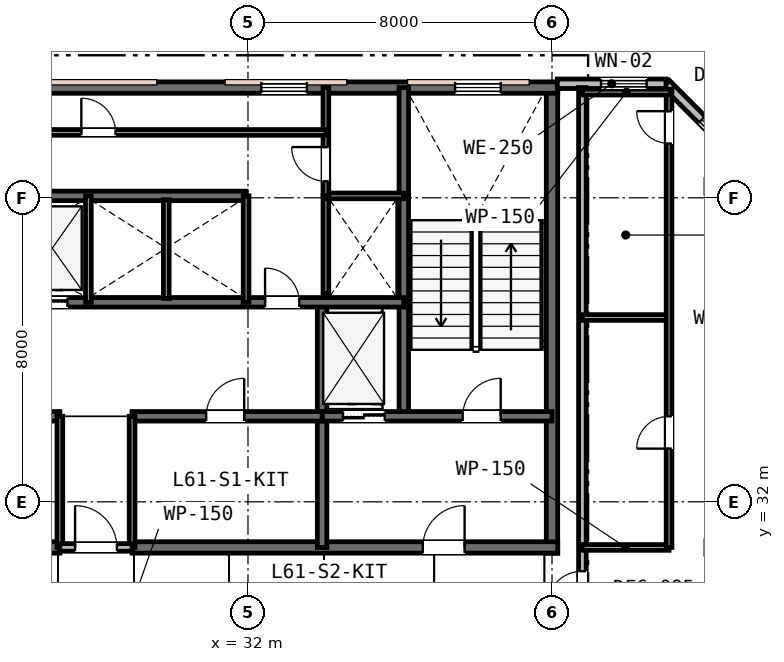
"""IFC4 building model, lengths in metres.
Left out: names, types, materials, properties, quantities, classifications, styles, units other than length and angle.
Written with IfcOpenShell. Run it as: python <this file> out.ifc"""

import sys

from ifc_helpers import new_model, si_unit, direction, frame, frame_2d, origin, place, context, subcontext, project, spatial, rectangle, extrude, element, fill, save


model = new_model("IFC4")
c1 = context("Model", 3, precision=1e-05, world=origin(), true_north=direction((0.0, 1.0)))
c2 = subcontext(c1, "Body", "Model", "MODEL_VIEW")
j1 = project(units=[si_unit("LENGTHUNIT", "METRE"), si_unit("PLANEANGLEUNIT", "RADIAN")], contexts=[c1])
p1 = place(None, origin())
s1 = spatial("IfcSite", under=j1, at=p1, CompositionType="ELEMENT")
p2 = place(p1, origin())
s2 = spatial("IfcBuilding", under=s1, at=p2, CompositionType="ELEMENT")
p3 = place(p2, frame((0.0, 0.0, 237.4)))
s3 = spatial("IfcBuildingStorey", under=s2, at=p3, CompositionType="ELEMENT", Elevation=237.4)
p4 = place(p3, frame((40.0, 30.65, 0.0), z_axis=(0.0, 0.0, 1.0), x_axis=(0.0, 1.0, 0.0)))
e1 = element("IfcWall", 1, at=p4, inside=s3, PredefinedType="SHEAR", context=c2, shape_type="SweptSolid", body=[
    extrude(rectangle(XDim=12.3, YDim=0.3, at=frame_2d((6.15, 0.0))), origin(), (0.0, 0.0, 1.0), 3.8),
])
p5 = place(p3, frame((15.85, 42.9, 0.0), z_axis=(0.0, 0.0, 1.0), x_axis=(1.0, 0.0, 0.0)))
e2 = element("IfcWall", 2, at=p5, inside=s3, PredefinedType="SHEAR", context=c2, shape_type="SweptSolid", body=[
    extrude(rectangle(XDim=24.3, YDim=0.3, at=frame_2d((12.15, 0.0))), origin(), (0.0, 0.0, 1.0), 3.8),
])
p6 = place(p5, frame((1.6, 0.0, 0.95)))
e3 = element("IfcOpeningElement", 3, at=p6, cuts=e2, PredefinedType="OPENING", context=c2, shape_type="SweptSolid", body=[
    extrude(rectangle(XDim=1.2, YDim=1.6, at=frame_2d((0.6, 0.8))), frame((0.0, 0.16, 0.0), z_axis=(0.0, -1.0, 0.0), x_axis=(1.0, 0.0, 0.0)), (0.0, 0.0, 1.0), 0.32),
])
p7 = place(p5, frame((16.5, 0.0, 0.95)))
e4 = element("IfcOpeningElement", 4, at=p7, cuts=e2, PredefinedType="OPENING", context=c2, shape_type="SweptSolid", body=[
    extrude(rectangle(XDim=1.2, YDim=1.6, at=frame_2d((0.6, 0.8))), frame((0.0, 0.16, 0.0), z_axis=(0.0, -1.0, 0.0), x_axis=(1.0, 0.0, 0.0)), (0.0, 0.0, 1.0), 0.32),
])
p8 = place(p5, frame((21.6, 0.0, 0.95)))
e5 = element("IfcOpeningElement", 5, at=p8, cuts=e2, PredefinedType="OPENING", context=c2, shape_type="SweptSolid", body=[
    extrude(rectangle(XDim=1.2, YDim=1.6, at=frame_2d((0.6, 0.8))), frame((0.0, 0.16, 0.0), z_axis=(0.0, -1.0, 0.0), x_axis=(1.0, 0.0, 0.0)), (0.0, 0.0, 1.0), 0.32),
])
p9 = place(p3, frame((15.85, 30.8, 0.0), z_axis=(0.0, 0.0, 1.0), x_axis=(1.0, 0.0, 0.0)))
e6 = element("IfcWall", 6, at=p9, inside=s3, PredefinedType="SHEAR", context=c2, shape_type="SweptSolid", body=[
    extrude(rectangle(XDim=11.2, YDim=0.3, at=frame_2d((5.6, 0.0))), origin(), (0.0, 0.0, 1.0), 3.8),
])
p10 = place(p9, frame((2.45, 0.0, 0.0)))
e7 = element("IfcOpeningElement", 7, at=p10, cuts=e6, PredefinedType="OPENING", context=c2, shape_type="SweptSolid", body=[
    extrude(rectangle(XDim=1.1, YDim=2.15, at=frame_2d((0.55, 1.075))), frame((0.0, 0.16, 0.0), z_axis=(0.0, -1.0, 0.0), x_axis=(1.0, 0.0, 0.0)), (0.0, 0.0, 1.0), 0.32),
])
p11 = place(p3, frame((28.95, 30.8, 0.0), z_axis=(0.0, 0.0, 1.0), x_axis=(1.0, 0.0, 0.0)))
e8 = element("IfcWall", 8, at=p11, inside=s3, PredefinedType="SHEAR", context=c2, shape_type="SweptSolid", body=[
    extrude(rectangle(XDim=11.2, YDim=0.3, at=frame_2d((5.6, 0.0))), origin(), (0.0, 0.0, 1.0), 3.8),
])
p12 = place(p11, frame((7.65, 0.0, 0.0)))
e9 = element("IfcOpeningElement", 9, at=p12, cuts=e8, PredefinedType="OPENING", context=c2, shape_type="SweptSolid", body=[
    extrude(rectangle(XDim=1.1, YDim=2.15, at=frame_2d((0.55, 1.075))), frame((0.0, 0.16, 0.0), z_axis=(0.0, -1.0, 0.0), x_axis=(1.0, 0.0, 0.0)), (0.0, 0.0, 1.0), 0.32),
])
p13 = place(p3, frame((36.1, 34.25, 0.0), z_axis=(0.0, 0.0, 1.0), x_axis=(0.0, 1.0, 0.0)))
e10 = element("IfcWall", 10, at=p13, inside=s3, PredefinedType="SHEAR", context=c2, shape_type="SweptSolid", body=[
    extrude(rectangle(XDim=8.65, YDim=0.25, at=frame_2d((4.325, 0.0))), origin(), (0.0, 0.0, 1.0), 3.8),
])
p14 = place(p3, frame((33.95, 30.8, 0.0), z_axis=(0.0, 0.0, 1.0), x_axis=(0.0, 1.0, 0.0)))
e11 = element("IfcWall", 11, at=p14, inside=s3, PredefinedType="SHEAR", context=c2, shape_type="SweptSolid", body=[
    extrude(rectangle(XDim=6.45, YDim=0.25, at=frame_2d((3.225, 0.0))), origin(), (0.0, 0.0, 1.0), 3.8),
])
p15 = place(p3, frame((33.95, 34.25, 0.0), z_axis=(0.0, 0.0, 1.0), x_axis=(1.0, 0.0, 0.0)))
e12 = element("IfcWall", 12, at=p15, inside=s3, PredefinedType="SHEAR", context=c2, shape_type="SweptSolid", body=[
    extrude(rectangle(XDim=6.05, YDim=0.25, at=frame_2d((3.025, 0.0))), origin(), (0.0, 0.0, 1.0), 3.8),
])
p16 = place(p15, frame((3.7, 0.0, 0.0)))
e13 = element("IfcOpeningElement", 13, at=p16, cuts=e12, PredefinedType="OPENING", context=c2, shape_type="SweptSolid", body=[
    extrude(rectangle(XDim=1.0, YDim=2.15, at=frame_2d((0.5, 1.075))), frame((0.0, 0.135, 0.0), z_axis=(0.0, -1.0, 0.0), x_axis=(1.0, 0.0, 0.0)), (0.0, 0.0, 1.0), 0.27),
])
p17 = place(p15, frame((0.55, 0.0, 0.0)))
e14 = element("IfcOpeningElement", 14, at=p17, cuts=e12, PredefinedType="OPENING", context=c2, shape_type="SweptSolid", body=[
    extrude(rectangle(XDim=1.1, YDim=2.15, at=frame_2d((0.55, 1.075))), frame((0.0, 0.135, 0.0), z_axis=(0.0, -1.0, 0.0), x_axis=(1.0, 0.0, 0.0)), (0.0, 0.0, 1.0), 0.27),
])
p18 = place(p3, frame((22.05, 34.25, 0.0), z_axis=(0.0, 0.0, 1.0), x_axis=(1.0, 0.0, 0.0)))
e15 = element("IfcWall", 15, at=p18, inside=s3, PredefinedType="SHEAR", context=c2, shape_type="SweptSolid", body=[
    extrude(rectangle(XDim=5.0, YDim=0.25, at=frame_2d((2.5, 0.0))), origin(), (0.0, 0.0, 1.0), 3.8),
])
p19 = place(p18, frame((1.95, 0.0, 0.0)))
e16 = element("IfcOpeningElement", 16, at=p19, cuts=e15, PredefinedType="OPENING", context=c2, shape_type="SweptSolid", body=[
    extrude(rectangle(XDim=1.0, YDim=2.15, at=frame_2d((0.5, 1.075))), frame((0.0, 0.135, 0.0), z_axis=(0.0, -1.0, 0.0), x_axis=(1.0, 0.0, 0.0)), (0.0, 0.0, 1.0), 0.27),
])
p20 = place(p3, frame((28.95, 34.25, 0.0), z_axis=(0.0, 0.0, 1.0), x_axis=(1.0, 0.0, 0.0)))
e17 = element("IfcWall", 17, at=p20, inside=s3, PredefinedType="SHEAR", context=c2, shape_type="SweptSolid", body=[
    extrude(rectangle(XDim=5.0, YDim=0.25, at=frame_2d((2.5, 0.0))), origin(), (0.0, 0.0, 1.0), 3.8),
])
p21 = place(p20, frame((1.95, 0.0, 0.0)))
e18 = element("IfcOpeningElement", 18, at=p21, cuts=e17, PredefinedType="OPENING", context=c2, shape_type="SweptSolid", body=[
    extrude(rectangle(XDim=1.0, YDim=2.15, at=frame_2d((0.5, 1.075))), frame((0.0, 0.135, 0.0), z_axis=(0.0, -1.0, 0.0), x_axis=(1.0, 0.0, 0.0)), (0.0, 0.0, 1.0), 0.27),
])
p22 = place(p3, frame((19.9, 37.25, 0.0), z_axis=(0.0, 0.0, 1.0), x_axis=(1.0, 0.0, 0.0)))
e19 = element("IfcWall", 19, at=p22, inside=s3, PredefinedType="SHEAR", context=c2, shape_type="SweptSolid", body=[
    extrude(rectangle(XDim=16.2, YDim=0.25, at=frame_2d((8.1, 0.0))), origin(), (0.0, 0.0, 1.0), 3.8),
])
p23 = place(p22, frame((12.55, 0.0, 0.0)))
e20 = element("IfcOpeningElement", 20, at=p23, cuts=e19, PredefinedType="OPENING", context=c2, shape_type="SweptSolid", body=[
    extrude(rectangle(XDim=0.9, YDim=2.15, at=frame_2d((0.45, 1.075))), frame((0.0, 0.135, 0.0), z_axis=(0.0, -1.0, 0.0), x_axis=(1.0, 0.0, 0.0)), (0.0, 0.0, 1.0), 0.27),
])
p24 = place(p22, frame((2.5, 0.0, 0.0)))
e21 = element("IfcOpeningElement", 21, at=p24, cuts=e19, PredefinedType="OPENING", context=c2, shape_type="SweptSolid", body=[
    extrude(rectangle(XDim=1.05, YDim=2.15, at=frame_2d((0.525, 1.075))), frame((0.0, 0.135, 0.0), z_axis=(0.0, -1.0, 0.0), x_axis=(1.0, 0.0, 0.0)), (0.0, 0.0, 1.0), 0.27),
])
p25 = place(p22, frame((4.4, 0.0, 0.0)))
e22 = element("IfcOpeningElement", 22, at=p25, cuts=e19, PredefinedType="OPENING", context=c2, shape_type="SweptSolid", body=[
    extrude(rectangle(XDim=1.05, YDim=2.15, at=frame_2d((0.525, 1.075))), frame((0.0, 0.135, 0.0), z_axis=(0.0, -1.0, 0.0), x_axis=(1.0, 0.0, 0.0)), (0.0, 0.0, 1.0), 0.27),
])
p26 = place(p22, frame((6.3, 0.0, 0.0)))
e23 = element("IfcOpeningElement", 23, at=p26, cuts=e19, PredefinedType="OPENING", context=c2, shape_type="SweptSolid", body=[
    extrude(rectangle(XDim=1.05, YDim=2.15, at=frame_2d((0.525, 1.075))), frame((0.0, 0.135, 0.0), z_axis=(0.0, -1.0, 0.0), x_axis=(1.0, 0.0, 0.0)), (0.0, 0.0, 1.0), 0.27),
])
p27 = place(p3, frame((19.9, 40.05, 0.0), z_axis=(0.0, 0.0, 1.0), x_axis=(1.0, 0.0, 0.0)))
e24 = element("IfcWall", 24, at=p27, inside=s3, PredefinedType="SHEAR", context=c2, shape_type="SweptSolid", body=[
    extrude(rectangle(XDim=12.05, YDim=0.25, at=frame_2d((6.025, 0.0))), origin(), (0.0, 0.0, 1.0), 3.8),
])
p28 = place(p3, frame((46.0, 40.0, 0.0), z_axis=(0.0, 0.0, 1.0), x_axis=(-0.707106781187, 0.707106781187, 0.0)))
e25 = element("IfcWall", 25, at=p28, inside=s3, PredefinedType="STANDARD", context=c2, shape_type="SweptSolid", body=[
    extrude(rectangle(XDim=4.243, YDim=0.25, at=frame_2d((2.121, 0.0))), origin(), (0.0, 0.0, 1.0), 3.53),
])
p29 = place(p28, frame((1.111, 0.0, 0.75)))
e26 = element("IfcOpeningElement", 26, at=p29, cuts=e25, PredefinedType="OPENING", context=c2, shape_type="SweptSolid", body=[
    extrude(rectangle(XDim=1.8, YDim=1.85, at=frame_2d((0.9, 0.925))), frame((0.0, 0.135, 0.0), z_axis=(0.0, -1.0, 0.0), x_axis=(1.0, 0.0, 0.0)), (0.0, 0.0, 1.0), 0.27),
])
p30 = place(p3, frame((43.0, 43.0, 0.0), z_axis=(0.0, 0.0, 1.0), x_axis=(-1.0, 0.0, 0.0)))
e27 = element("IfcWall", 27, at=p30, inside=s3, PredefinedType="STANDARD", context=c2, shape_type="SweptSolid", body=[
    extrude(rectangle(XDim=2.86, YDim=0.25, at=frame_2d((1.43, 0.0))), origin(), (0.0, 0.0, 1.0), 3.53),
])
p31 = place(p30, frame((0.51, 0.0, 0.85)))
e28 = element("IfcOpeningElement", 28, at=p31, cuts=e27, PredefinedType="OPENING", context=c2, shape_type="SweptSolid", body=[
    extrude(rectangle(XDim=1.2, YDim=1.6, at=frame_2d((0.6, 0.8))), frame((0.0, 0.135, 0.0), z_axis=(0.0, -1.0, 0.0), x_axis=(1.0, 0.0, 0.0)), (0.0, 0.0, 1.0), 0.27),
])
for number, where, z_axis, x_axis in (
    (29, (27.05, 30.8, 0.0), (0.0, 0.0, 1.0), (0.0, 1.0, 0.0)),
    (30, (28.95, 30.8, 0.0), (0.0, 0.0, 1.0), (0.0, 1.0, 0.0)),
):
    element("IfcWall", number, at=place(p3, frame(where, z_axis=z_axis, x_axis=x_axis)), inside=s3, PredefinedType="PLUMBINGWALL", context=c2, shape_type="SweptSolid", body=[
        extrude(rectangle(XDim=3.45, YDim=0.15, at=frame_2d((1.725, 0.0))), origin(), (0.0, 0.0, 1.0), 3.22),
    ])
p32 = place(p3, frame((27.05, 30.8, 0.0), z_axis=(0.0, 0.0, 1.0), x_axis=(1.0, 0.0, 0.0)))
e31 = element("IfcWall", 31, at=p32, inside=s3, PredefinedType="PARTITIONING", context=c2, shape_type="SweptSolid", body=[
    extrude(rectangle(XDim=1.9, YDim=0.2, at=frame_2d((0.95, 0.0))), origin(), (0.0, 0.0, 1.0), 3.22),
])
p33 = place(p32, frame((0.4, 0.0, 0.0)))
e32 = element("IfcOpeningElement", 32, at=p33, cuts=e31, PredefinedType="OPENING", context=c2, shape_type="SweptSolid", body=[
    extrude(rectangle(XDim=1.1, YDim=2.15, at=frame_2d((0.55, 1.075))), frame((0.0, 0.11, 0.0), z_axis=(0.0, -1.0, 0.0), x_axis=(1.0, 0.0, 0.0)), (0.0, 0.0, 1.0), 0.22),
])
for number, where, z_axis, x_axis in (
    (33, (27.8, 37.25, 0.0), (0.0, 0.0, 1.0), (0.0, 1.0, 0.0)),
    (34, (31.95, 37.25, 0.0), (0.0, 0.0, 1.0), (0.0, 1.0, 0.0)),
):
    element("IfcWall", number, at=place(p3, frame(where, z_axis=z_axis, x_axis=x_axis)), inside=s3, PredefinedType="PLUMBINGWALL", context=c2, shape_type="SweptSolid", body=[
        extrude(rectangle(XDim=2.8, YDim=0.15, at=frame_2d((1.4, 0.0))), origin(), (0.0, 0.0, 1.0), 3.53),
    ])
p34 = place(p3, frame((29.85, 37.35, 0.0), z_axis=(0.0, 0.0, 1.0), x_axis=(0.0, 1.0, 0.0)))
e35 = element("IfcWall", 35, at=p34, inside=s3, PredefinedType="PLUMBINGWALL", context=c2, shape_type="SweptSolid", body=[
    extrude(rectangle(XDim=2.6, YDim=0.15, at=frame_2d((1.3, 0.0))), origin(), (0.0, 0.0, 1.0), 3.53),
])
p35 = place(p3, frame((34.05, 37.473, 0.0), z_axis=(0.0, 0.0, 1.0), x_axis=(0.0, 1.0, 0.0)))
e36 = element("IfcWall", 36, at=p35, inside=s3, PredefinedType="PLUMBINGWALL", context=c2, shape_type="SweptSolid", body=[
    extrude(rectangle(XDim=2.577, YDim=0.15, at=frame_2d((1.288, 0.0))), origin(), (0.0, 0.0, 1.0), 3.53),
])
p36 = place(p3, frame((34.05, 40.05, 0.0), z_axis=(0.0, 0.0, 1.0), x_axis=(1.0, 0.0, 0.0)))
e37 = element("IfcWall", 37, at=p36, inside=s3, PredefinedType="PARTITIONING", context=c2, shape_type="SweptSolid", body=[
    extrude(rectangle(XDim=2.05, YDim=0.15, at=frame_2d((1.025, 0.0))), origin(), (0.0, 0.0, 1.0), 3.53),
])
p37 = place(p3, frame((34.05, 40.05, 0.0), z_axis=(0.0, 0.0, 1.0), x_axis=(0.0, 1.0, 0.0)))
e38 = element("IfcWall", 38, at=p37, inside=s3, PredefinedType="PARTITIONING", context=c2, shape_type="SweptSolid", body=[
    extrude(rectangle(XDim=2.85, YDim=0.15, at=frame_2d((1.425, 0.0))), origin(), (0.0, 0.0, 1.0), 3.53),
])
p38 = place(p37, frame((0.385, 0.0, 0.0)))
e39 = element("IfcOpeningElement", 39, at=p38, cuts=e38, PredefinedType="OPENING", context=c2, shape_type="SweptSolid", body=[
    extrude(rectangle(XDim=0.9, YDim=2.15, at=frame_2d((0.45, 1.075))), frame((0.0, 0.085, 0.0), z_axis=(0.0, -1.0, 0.0), x_axis=(1.0, 0.0, 0.0)), (0.0, 0.0, 1.0), 0.17),
])
p39 = place(p3, frame((22.08, 41.72, 0.0), z_axis=(0.0, 0.0, 1.0), x_axis=(1.0, 0.0, 0.0)))
e40 = element("IfcWall", 40, at=p39, inside=s3, PredefinedType="PARTITIONING", context=c2, shape_type="SweptSolid", body=[
    extrude(rectangle(XDim=11.97, YDim=0.15, at=frame_2d((5.985, 0.0))), origin(), (0.0, 0.0, 1.0), 3.53),
])
p40 = place(p39, frame((5.535, 0.0, 0.0)))
e41 = element("IfcOpeningElement", 41, at=p40, cuts=e40, PredefinedType="OPENING", context=c2, shape_type="SweptSolid", body=[
    extrude(rectangle(XDim=0.9, YDim=2.15, at=frame_2d((0.45, 1.075))), frame((0.0, 0.085, 0.0), z_axis=(0.0, -1.0, 0.0), x_axis=(1.0, 0.0, 0.0)), (0.0, 0.0, 1.0), 0.17),
])
p41 = place(p3, frame((40.8, 28.6, 0.0), z_axis=(0.0, 0.0, 1.0), x_axis=(0.0, 1.0, 0.0)))
e42 = element("IfcWall", 42, at=p41, inside=s3, PredefinedType="PARTITIONING", context=c2, shape_type="SweptSolid", body=[
    extrude(rectangle(XDim=14.3, YDim=0.2, at=frame_2d((7.15, 0.0))), origin(), (0.0, 0.0, 1.0), 2.92),
])
p42 = place(p41, frame((0.625, 0.0, 0.0)))
e43 = element("IfcOpeningElement", 43, at=p42, cuts=e42, PredefinedType="OPENING", context=c2, shape_type="SweptSolid", body=[
    extrude(rectangle(XDim=0.95, YDim=2.15, at=frame_2d((0.475, 1.075))), frame((0.0, 0.11, 0.0), z_axis=(0.0, -1.0, 0.0), x_axis=(1.0, 0.0, 0.0)), (0.0, 0.0, 1.0), 0.22),
])
p43 = place(p3, frame((40.8, 30.8, 0.0), z_axis=(0.0, 0.0, 1.0), x_axis=(1.0, 0.0, 0.0)))
e44 = element("IfcWall", 44, at=p43, inside=s3, PredefinedType="PARTITIONING", context=c2, shape_type="SweptSolid", body=[
    extrude(rectangle(XDim=2.28, YDim=0.15, at=frame_2d((1.14, 0.0))), origin(), (0.0, 0.0, 1.0), 2.92),
])
p44 = place(p3, frame((40.8, 36.85, 0.0), z_axis=(0.0, 0.0, 1.0), x_axis=(1.0, 0.0, 0.0)))
e45 = element("IfcWall", 45, at=p44, inside=s3, PredefinedType="PARTITIONING", context=c2, shape_type="SweptSolid", body=[
    extrude(rectangle(XDim=2.28, YDim=0.15, at=frame_2d((1.14, 0.0))), origin(), (0.0, 0.0, 1.0), 3.53),
])
p45 = place(p3, frame((43.08, 30.8, 0.0), z_axis=(0.0, 0.0, 1.0), x_axis=(0.0, 1.0, 0.0)))
e46 = element("IfcWall", 46, at=p45, inside=s3, PredefinedType="PARTITIONING", context=c2, shape_type="SweptSolid", body=[
    extrude(rectangle(XDim=12.02, YDim=0.15, at=frame_2d((6.01, 0.0))), origin(), (0.0, 0.0, 1.0), 2.92),
])
p46 = place(p45, frame((2.6, 0.0, 0.0)))
e47 = element("IfcOpeningElement", 47, at=p46, cuts=e46, PredefinedType="OPENING", context=c2, shape_type="SweptSolid", body=[
    extrude(rectangle(XDim=0.85, YDim=2.15, at=frame_2d((0.425, 1.075))), frame((0.0, 0.085, 0.0), z_axis=(0.0, -1.0, 0.0), x_axis=(1.0, 0.0, 0.0)), (0.0, 0.0, 1.0), 0.17),
])
p47 = place(p45, frame((10.629, 0.0, 0.0)))
e48 = element("IfcOpeningElement", 48, at=p47, cuts=e46, PredefinedType="OPENING", context=c2, shape_type="SweptSolid", body=[
    extrude(rectangle(XDim=0.85, YDim=2.15, at=frame_2d((0.425, 1.075))), frame((0.0, 0.085, 0.0), z_axis=(0.0, -1.0, 0.0), x_axis=(1.0, 0.0, 0.0)), (0.0, 0.0, 1.0), 0.17),
])
p48 = place(p3, frame((40.8, 42.78, 0.0), z_axis=(0.0, 0.0, 1.0), x_axis=(1.0, 0.0, 0.0)))
e49 = element("IfcWall", 49, at=p48, inside=s3, PredefinedType="PARTITIONING", context=c2, shape_type="SweptSolid", body=[
    extrude(rectangle(XDim=2.32, YDim=0.15, at=frame_2d((1.16, 0.0))), origin(), (0.0, 0.0, 1.0), 3.53),
])
p49 = place(p7, origin())
e50 = element("IfcWindow", 50, at=p49, inside=s3, PartitioningType="SINGLE_PANEL", PredefinedType="WINDOW", context=c2, shape_type="SweptSolid", body=[
    extrude(rectangle(XDim=1.2, YDim=1.6, at=frame_2d((0.6, 0.8))), frame((0.0, 0.03, 0.0), z_axis=(0.0, -1.0, 0.0), x_axis=(1.0, 0.0, 0.0)), (0.0, 0.0, 1.0), 0.06),
])
fill(e4, e50)
p50 = place(p8, origin())
e51 = element("IfcWindow", 51, at=p50, inside=s3, PartitioningType="SINGLE_PANEL", PredefinedType="WINDOW", context=c2, shape_type="SweptSolid", body=[
    extrude(rectangle(XDim=1.2, YDim=1.6, at=frame_2d((0.6, 0.8))), frame((0.0, 0.03, 0.0), z_axis=(0.0, -1.0, 0.0), x_axis=(1.0, 0.0, 0.0)), (0.0, 0.0, 1.0), 0.06),
])
fill(e5, e51)
p51 = place(p29, origin())
e52 = element("IfcWindow", 52, at=p51, inside=s3, PartitioningType="SINGLE_PANEL", PredefinedType="WINDOW", context=c2, shape_type="SweptSolid", body=[
    extrude(rectangle(XDim=1.8, YDim=1.85, at=frame_2d((0.9, 0.925))), frame((0.0, 0.03, 0.0), z_axis=(0.0, -1.0, 0.0), x_axis=(1.0, 0.0, 0.0)), (0.0, 0.0, 1.0), 0.06),
])
fill(e26, e52)
p52 = place(p31, origin())
e53 = element("IfcWindow", 53, at=p52, inside=s3, PartitioningType="SINGLE_PANEL", PredefinedType="WINDOW", context=c2, shape_type="SweptSolid", body=[
    extrude(rectangle(XDim=1.2, YDim=1.6, at=frame_2d((0.6, 0.8))), frame((0.0, 0.03, 0.0), z_axis=(0.0, -1.0, 0.0), x_axis=(1.0, 0.0, 0.0)), (0.0, 0.0, 1.0), 0.06),
])
fill(e28, e53)
p53 = place(p33, origin())
e54 = element("IfcDoor", 54, at=p53, inside=s3, OperationType="SINGLE_SWING_LEFT", PredefinedType="DOOR", context=c2, shape_type="SweptSolid", body=[
    extrude(rectangle(XDim=1.1, YDim=2.15, at=frame_2d((0.55, 1.075))), frame((0.0, 0.025, 0.0), z_axis=(0.0, -1.0, 0.0), x_axis=(1.0, 0.0, 0.0)), (0.0, 0.0, 1.0), 0.05),
])
fill(e32, e54)
p54 = place(p16, origin())
e55 = element("IfcDoor", 55, at=p54, inside=s3, OperationType="SINGLE_SWING_RIGHT", PredefinedType="DOOR", context=c2, shape_type="SweptSolid", body=[
    extrude(rectangle(XDim=1.0, YDim=2.15, at=frame_2d((0.5, 1.075))), frame((0.0, 0.025, 0.0), z_axis=(0.0, -1.0, 0.0), x_axis=(1.0, 0.0, 0.0)), (0.0, 0.0, 1.0), 0.05),
])
fill(e13, e55)
p55 = place(p12, origin())
e56 = element("IfcDoor", 56, at=p55, inside=s3, OperationType="SINGLE_SWING_RIGHT", PredefinedType="DOOR", context=c2, shape_type="SweptSolid", body=[
    extrude(rectangle(XDim=1.1, YDim=2.15, at=frame_2d((0.55, 1.075))), frame((0.0, 0.025, 0.0), z_axis=(0.0, -1.0, 0.0), x_axis=(1.0, 0.0, 0.0)), (0.0, 0.0, 1.0), 0.05),
])
fill(e9, e56)
p56 = place(p21, origin())
e57 = element("IfcDoor", 57, at=p56, inside=s3, OperationType="SINGLE_SWING_RIGHT", PredefinedType="DOOR", context=c2, shape_type="SweptSolid", body=[
    extrude(rectangle(XDim=1.0, YDim=2.15, at=frame_2d((0.5, 1.075))), frame((0.0, 0.025, 0.0), z_axis=(0.0, -1.0, 0.0), x_axis=(1.0, 0.0, 0.0)), (0.0, 0.0, 1.0), 0.05),
])
fill(e18, e57)
p57 = place(p23, origin())
e58 = element("IfcDoor", 58, at=p57, inside=s3, OperationType="SINGLE_SWING_LEFT", PredefinedType="DOOR", context=c2, shape_type="SweptSolid", body=[
    extrude(rectangle(XDim=0.9, YDim=2.15, at=frame_2d((0.45, 1.075))), frame((0.0, 0.025, 0.0), z_axis=(0.0, -1.0, 0.0), x_axis=(1.0, 0.0, 0.0)), (0.0, 0.0, 1.0), 0.05),
])
fill(e20, e58)
p58 = place(p38, origin())
e59 = element("IfcDoor", 59, at=p58, inside=s3, OperationType="SINGLE_SWING_RIGHT", PredefinedType="DOOR", context=c2, shape_type="SweptSolid", body=[
    extrude(rectangle(XDim=0.9, YDim=2.15, at=frame_2d((0.45, 1.075))), frame((0.0, 0.025, 0.0), z_axis=(0.0, -1.0, 0.0), x_axis=(1.0, 0.0, 0.0)), (0.0, 0.0, 1.0), 0.05),
])
fill(e39, e59)
p59 = place(p40, origin())
e60 = element("IfcDoor", 60, at=p59, inside=s3, OperationType="SINGLE_SWING_LEFT", PredefinedType="DOOR", context=c2, shape_type="SweptSolid", body=[
    extrude(rectangle(XDim=0.9, YDim=2.15, at=frame_2d((0.45, 1.075))), frame((0.0, 0.025, 0.0), z_axis=(0.0, -1.0, 0.0), x_axis=(1.0, 0.0, 0.0)), (0.0, 0.0, 1.0), 0.05),
])
fill(e41, e60)
p60 = place(p42, origin())
e61 = element("IfcDoor", 61, at=p60, inside=s3, OperationType="SINGLE_SWING_LEFT", PredefinedType="DOOR", context=c2, shape_type="SweptSolid", body=[
    extrude(rectangle(XDim=0.95, YDim=2.15, at=frame_2d((0.475, 1.075))), frame((0.0, 0.025, 0.0), z_axis=(0.0, -1.0, 0.0), x_axis=(1.0, 0.0, 0.0)), (0.0, 0.0, 1.0), 0.05),
])
fill(e43, e61)
p61 = place(p46, origin())
e62 = element("IfcDoor", 62, at=p61, inside=s3, OperationType="SINGLE_SWING_LEFT", PredefinedType="DOOR", context=c2, shape_type="SweptSolid", body=[
    extrude(rectangle(XDim=0.85, YDim=2.15, at=frame_2d((0.425, 1.075))), frame((0.0, 0.025, 0.0), z_axis=(0.0, -1.0, 0.0), x_axis=(1.0, 0.0, 0.0)), (0.0, 0.0, 1.0), 0.05),
])
fill(e47, e62)
p62 = place(p47, origin())
e63 = element("IfcDoor", 63, at=p62, inside=s3, OperationType="SINGLE_SWING_RIGHT", PredefinedType="DOOR", context=c2, shape_type="SweptSolid", body=[
    extrude(rectangle(XDim=0.85, YDim=2.15, at=frame_2d((0.425, 1.075))), frame((0.0, 0.025, 0.0), z_axis=(0.0, -1.0, 0.0), x_axis=(1.0, 0.0, 0.0)), (0.0, 0.0, 1.0), 0.05),
])
fill(e48, e63)
p63 = place(p17, origin())
e64 = element("IfcDoor", 64, at=p63, inside=s3, OperationType="DOUBLE_DOOR_SLIDING", PredefinedType="DOOR", context=c2, shape_type="SweptSolid", body=[
    extrude(rectangle(XDim=1.1, YDim=2.15, at=frame_2d((0.55, 1.075))), frame((0.0, 0.025, 0.0), z_axis=(0.0, -1.0, 0.0), x_axis=(1.0, 0.0, 0.0)), (0.0, 0.0, 1.0), 0.05),
])
fill(e14, e64)
p64 = place(p26, origin())
e65 = element("IfcDoor", 65, at=p64, inside=s3, OperationType="DOUBLE_DOOR_SLIDING", PredefinedType="DOOR", context=c2, shape_type="SweptSolid", body=[
    extrude(rectangle(XDim=1.05, YDim=2.15, at=frame_2d((0.525, 1.075))), frame((0.0, 0.025, 0.0), z_axis=(0.0, -1.0, 0.0), x_axis=(1.0, 0.0, 0.0)), (0.0, 0.0, 1.0), 0.05),
])
fill(e23, e65)
save(model, sys.argv[1])
